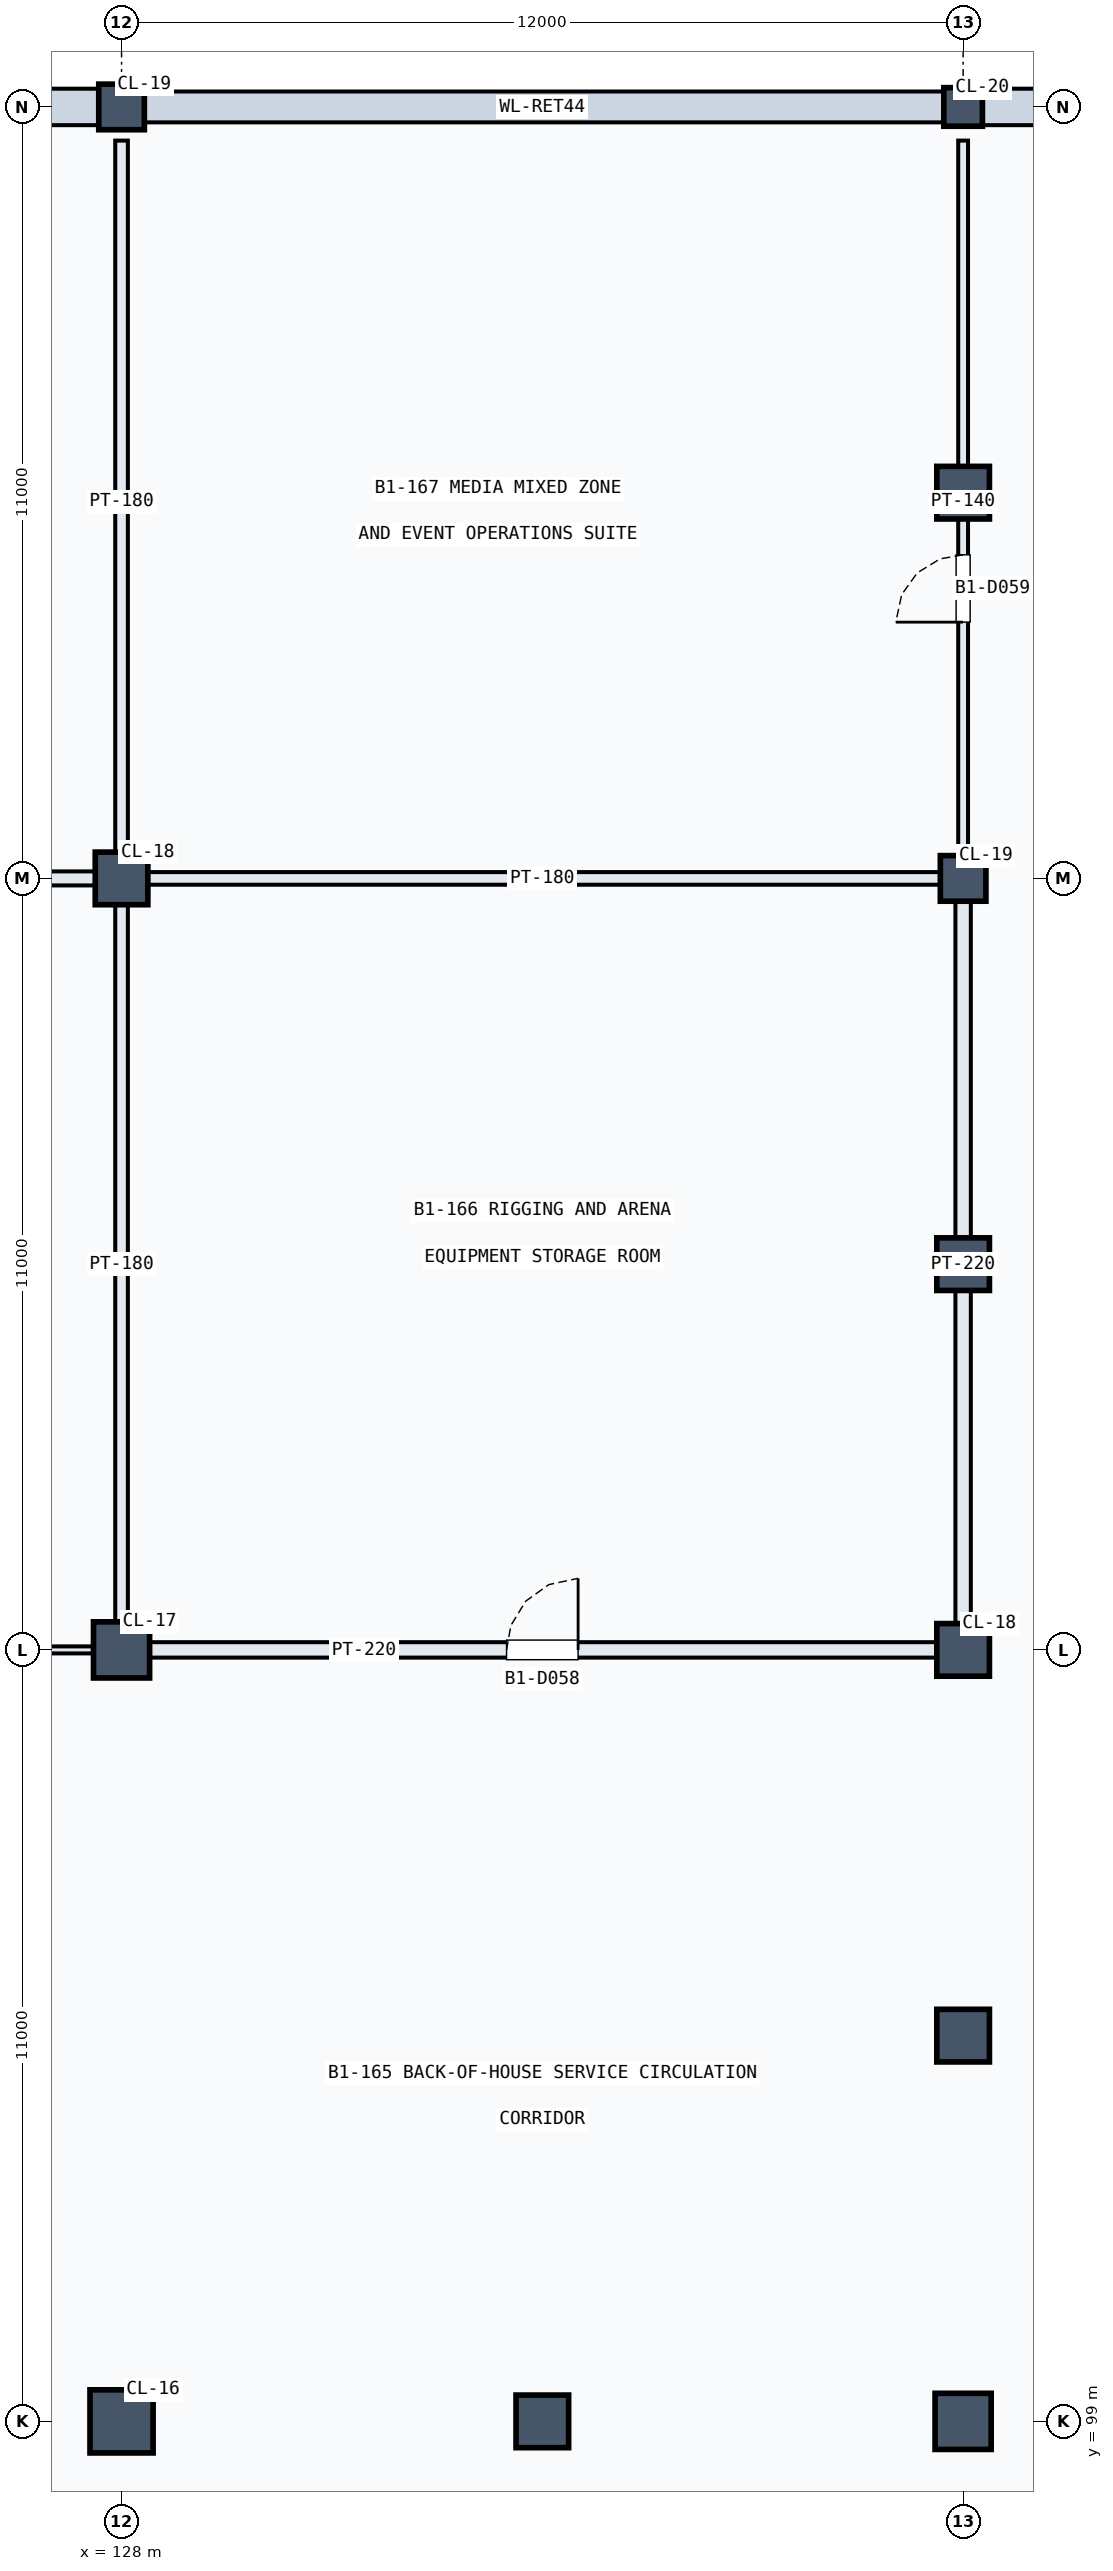
"""IFC4 building model, lengths in metres.
Left out: names, types, materials, properties, quantities, classifications, styles, units other than length and angle.
Written with IfcOpenShell. Run it as: python <this file> out.ifc"""

import sys

from ifc_helpers import new_model, si_unit, direction, frame, frame_2d, origin, origin_2d, place, context, subcontext, project, spatial, rectangle, circle, extrude, element, fill, save


model = new_model("IFC4")
c1 = context("Model", 3, precision=1e-05, world=origin(), true_north=direction((0.0, 1.0)))
c2 = subcontext(c1, "Body", "Model", "MODEL_VIEW")
j1 = project(units=[si_unit("LENGTHUNIT", "METRE"), si_unit("PLANEANGLEUNIT", "RADIAN")], contexts=[c1])
p1 = place(None, origin())
s1 = spatial("IfcSite", under=j1, at=p1, CompositionType="ELEMENT")
p2 = place(p1, origin())
s2 = spatial("IfcBuilding", under=s1, at=p2, CompositionType="ELEMENT")
p3 = place(p2, frame((0.0, 0.0, -5.4)))
s3 = spatial("IfcBuildingStorey", under=s2, at=p3, CompositionType="ELEMENT", Elevation=-5.4)
p4 = place(p3, frame((128.0, 99.0, 0.0), z_axis=(0.0, 0.0, 1.0), x_axis=(1.0, 0.0, 0.0)))
e1 = element("IfcColumn", 1, at=p4, inside=s3, PredefinedType="COLUMN", context=c2, shape_type="SweptSolid", body=[
    extrude(circle(Radius=0.45, at=origin_2d()), origin(), (0.0, 0.0, 1.0), 5.4),
])
p5 = place(p3, frame((128.0, 110.0, 0.0), z_axis=(0.0, 0.0, 1.0), x_axis=(1.0, 0.0, 0.0)))
e2 = element("IfcColumn", 2, at=p5, inside=s3, PredefinedType="COLUMN", context=c2, shape_type="SweptSolid", body=[
    extrude(circle(Radius=0.4, at=origin_2d()), origin(), (0.0, 0.0, 1.0), 5.4),
])
p6 = place(p3, frame((128.0, 121.0, 0.0), z_axis=(0.0, 0.0, 1.0), x_axis=(1.0, 0.0, 0.0)))
e3 = element("IfcColumn", 3, at=p6, inside=s3, PredefinedType="COLUMN", context=c2, shape_type="SweptSolid", body=[
    extrude(circle(Radius=0.375, at=origin_2d()), origin(), (0.0, 0.0, 1.0), 5.4),
])
p7 = place(p3, frame((128.0, 132.0, 0.0), z_axis=(0.0, 0.0, 1.0), x_axis=(1.0, 0.0, 0.0)))
e4 = element("IfcColumn", 4, at=p7, inside=s3, PredefinedType="COLUMN", context=c2, shape_type="SweptSolid", body=[
    extrude(circle(Radius=0.325, at=origin_2d()), origin(), (0.0, 0.0, 1.0), 5.4),
])
p8 = place(p3, frame((140.0, 99.0, 0.0), z_axis=(0.0, 0.0, 1.0), x_axis=(1.0, 0.0, 0.0)))
e5 = element("IfcColumn", 5, at=p8, inside=s3, PredefinedType="COLUMN", context=c2, shape_type="SweptSolid", body=[
    extrude(circle(Radius=0.4, at=origin_2d()), origin(), (0.0, 0.0, 1.0), 5.4),
])
p9 = place(p3, frame((140.0, 110.0, 0.0), z_axis=(0.0, 0.0, 1.0), x_axis=(1.0, 0.0, 0.0)))
e6 = element("IfcColumn", 6, at=p9, inside=s3, PredefinedType="COLUMN", context=c2, shape_type="SweptSolid", body=[
    extrude(circle(Radius=0.375, at=origin_2d()), origin(), (0.0, 0.0, 1.0), 5.4),
])
p10 = place(p3, frame((140.0, 121.0, 0.0), z_axis=(0.0, 0.0, 1.0), x_axis=(1.0, 0.0, 0.0)))
e7 = element("IfcColumn", 7, at=p10, inside=s3, PredefinedType="COLUMN", context=c2, shape_type="SweptSolid", body=[
    extrude(circle(Radius=0.325, at=origin_2d()), origin(), (0.0, 0.0, 1.0), 5.4),
])
p11 = place(p3, frame((140.0, 132.0, 0.0), z_axis=(0.0, 0.0, 1.0), x_axis=(1.0, 0.0, 0.0)))
e8 = element("IfcColumn", 8, at=p11, inside=s3, PredefinedType="COLUMN", context=c2, shape_type="SweptSolid", body=[
    extrude(circle(Radius=0.275, at=origin_2d()), origin(), (0.0, 0.0, 1.0), 5.4),
])
for number, where, z_axis, x_axis in (
    (9, (134.0, 99.0, 0.0), (0.0, 0.0, 1.0), (1.0, 0.0, 0.0)),
    (10, (140.0, 104.5, 0.0), (0.0, 0.0, 1.0), (1.0, 0.0, 0.0)),
    (11, (140.0, 115.5, 0.0), (0.0, 0.0, 1.0), (1.0, 0.0, 0.0)),
    (12, (140.0, 126.5, 0.0), (0.0, 0.0, 1.0), (1.0, 0.0, 0.0)),
):
    element("IfcColumn", number, at=place(p3, frame(where, z_axis=z_axis, x_axis=x_axis)), inside=s3, PredefinedType="COLUMN", context=c2, shape_type="SweptSolid", body=[
        extrude(circle(Radius=0.375, at=origin_2d()), origin(), (0.0, 0.0, 1.0), 5.4),
    ])
p12 = place(p3, frame((116.22, 132.0, 0.0), z_axis=(0.0, 0.0, 1.0), x_axis=(1.0, 0.0, 0.0)))
e13 = element("IfcWall", 13, at=p12, inside=s3, PredefinedType="SOLIDWALL", context=c2, shape_type="SweptSolid", body=[
    extrude(rectangle(XDim=11.56, YDim=0.52, at=frame_2d((5.78, 0.0))), origin(), (0.0, 0.0, 1.0), 4.418),
])
p13 = place(p3, frame((128.22, 132.0, 0.0), z_axis=(0.0, 0.0, 1.0), x_axis=(1.0, 0.0, 0.0)))
e14 = element("IfcWall", 14, at=p13, inside=s3, PredefinedType="SOLIDWALL", context=c2, shape_type="SweptSolid", body=[
    extrude(rectangle(XDim=11.56, YDim=0.44, at=frame_2d((5.78, 0.0))), origin(), (0.0, 0.0, 1.0), 4.418),
])
p14 = place(p3, frame((140.22, 132.0, 0.0), z_axis=(0.0, 0.0, 1.0), x_axis=(1.0, 0.0, 0.0)))
e15 = element("IfcWall", 15, at=p14, inside=s3, PredefinedType="SOLIDWALL", context=c2, shape_type="SweptSolid", body=[
    extrude(rectangle(XDim=11.56, YDim=0.52, at=frame_2d((5.78, 0.0))), origin(), (0.0, 0.0, 1.0), 4.23),
])
p15 = place(p3, frame((116.22, 110.0, 0.0), z_axis=(0.0, 0.0, 1.0), x_axis=(1.0, 0.0, 0.0)))
e16 = element("IfcWall", 16, at=p15, inside=s3, PredefinedType="PARTITIONING", context=c2, shape_type="SweptSolid", body=[
    extrude(rectangle(XDim=11.56, YDim=0.1, at=frame_2d((5.78, 0.0))), origin(), (0.0, 0.0, 1.0), 4.28),
])
p16 = place(p15, frame((4.805, 0.0, 0.0)))
e17 = element("IfcOpeningElement", 17, at=p16, cuts=e16, PredefinedType="OPENING", context=c2, shape_type="SweptSolid", body=[
    extrude(rectangle(XDim=1.95, YDim=2.4, at=frame_2d((0.975, 1.2))), frame((0.0, 0.06, 0.0), z_axis=(0.0, -1.0, 0.0), x_axis=(1.0, 0.0, 0.0)), (0.0, 0.0, 1.0), 0.12),
])
p17 = place(p3, frame((128.22, 110.0, 0.0), z_axis=(0.0, 0.0, 1.0), x_axis=(1.0, 0.0, 0.0)))
e18 = element("IfcWall", 18, at=p17, inside=s3, PredefinedType="PARTITIONING", context=c2, shape_type="SweptSolid", body=[
    extrude(rectangle(XDim=11.56, YDim=0.22, at=frame_2d((5.78, 0.0))), origin(), (0.0, 0.0, 1.0), 4.346),
])
p18 = place(p17, frame((5.27, 0.0, 0.0)))
e19 = element("IfcOpeningElement", 19, at=p18, cuts=e18, PredefinedType="OPENING", context=c2, shape_type="SweptSolid", body=[
    extrude(rectangle(XDim=1.02, YDim=2.25, at=frame_2d((0.51, 1.125))), frame((0.0, 0.12, 0.0), z_axis=(0.0, -1.0, 0.0), x_axis=(1.0, 0.0, 0.0)), (0.0, 0.0, 1.0), 0.24),
])
p19 = place(p3, frame((140.0, 110.22, 0.0), z_axis=(0.0, 0.0, 1.0), x_axis=(0.0, 1.0, 0.0)))
e20 = element("IfcWall", 20, at=p19, inside=s3, PredefinedType="PARTITIONING", context=c2, shape_type="SweptSolid", body=[
    extrude(rectangle(XDim=10.56, YDim=0.22, at=frame_2d((5.28, 0.0))), origin(), (0.0, 0.0, 1.0), 4.41),
])
p20 = place(p3, frame((140.0, 121.22, 0.0), z_axis=(0.0, 0.0, 1.0), x_axis=(0.0, 1.0, 0.0)))
e21 = element("IfcWall", 21, at=p20, inside=s3, PredefinedType="PARTITIONING", context=c2, shape_type="SweptSolid", body=[
    extrude(rectangle(XDim=10.3, YDim=0.14, at=frame_2d((5.15, 0.0))), origin(), (0.0, 0.0, 1.0), 4.43),
])
p21 = place(p20, frame((3.434, 0.0, 0.0)))
e22 = element("IfcOpeningElement", 22, at=p21, cuts=e21, PredefinedType="OPENING", context=c2, shape_type="SweptSolid", body=[
    extrude(rectangle(XDim=0.96, YDim=2.15, at=frame_2d((0.48, 1.075))), frame((0.0, 0.08, 0.0), z_axis=(0.0, -1.0, 0.0), x_axis=(1.0, 0.0, 0.0)), (0.0, 0.0, 1.0), 0.16),
])
p22 = place(p3, frame((116.22, 121.0, 0.0), z_axis=(0.0, 0.0, 1.0), x_axis=(1.0, 0.0, 0.0)))
e23 = element("IfcWall", 23, at=p22, inside=s3, PredefinedType="PARTITIONING", context=c2, shape_type="SweptSolid", body=[
    extrude(rectangle(XDim=11.56, YDim=0.2, at=frame_2d((5.78, 0.0))), origin(), (0.0, 0.0, 1.0), 4.33),
])
p23 = place(p3, frame((128.0, 110.22, 0.0), z_axis=(0.0, 0.0, 1.0), x_axis=(0.0, 1.0, 0.0)))
e24 = element("IfcWall", 24, at=p23, inside=s3, PredefinedType="PARTITIONING", context=c2, shape_type="SweptSolid", body=[
    extrude(rectangle(XDim=10.56, YDim=0.18, at=frame_2d((5.28, 0.0))), origin(), (0.0, 0.0, 1.0), 4.346),
])
p24 = place(p3, frame((128.0, 121.22, 0.0), z_axis=(0.0, 0.0, 1.0), x_axis=(0.0, 1.0, 0.0)))
e25 = element("IfcWall", 25, at=p24, inside=s3, PredefinedType="PARTITIONING", context=c2, shape_type="SweptSolid", body=[
    extrude(rectangle(XDim=10.3, YDim=0.18, at=frame_2d((5.15, 0.0))), origin(), (0.0, 0.0, 1.0), 4.41),
])
p25 = place(p3, frame((128.22, 121.0, 0.0), z_axis=(0.0, 0.0, 1.0), x_axis=(1.0, 0.0, 0.0)))
e26 = element("IfcWall", 26, at=p25, inside=s3, PredefinedType="PARTITIONING", context=c2, shape_type="SweptSolid", body=[
    extrude(rectangle(XDim=11.56, YDim=0.18, at=frame_2d((5.78, 0.0))), origin(), (0.0, 0.0, 1.0), 4.41),
])
p26 = place(p18, origin())
e27 = element("IfcDoor", 27, at=p26, inside=s3, OperationType="SINGLE_SWING_RIGHT", PredefinedType="DOOR", context=c2, shape_type="SweptSolid", body=[
    extrude(rectangle(XDim=1.02, YDim=2.25, at=frame_2d((0.51, 1.125))), frame((0.0, 0.025, 0.0), z_axis=(0.0, -1.0, 0.0), x_axis=(1.0, 0.0, 0.0)), (0.0, 0.0, 1.0), 0.05),
])
fill(e19, e27)
p27 = place(p21, origin())
e28 = element("IfcDoor", 28, at=p27, inside=s3, OperationType="SINGLE_SWING_LEFT", PredefinedType="DOOR", context=c2, shape_type="SweptSolid", body=[
    extrude(rectangle(XDim=0.96, YDim=2.15, at=frame_2d((0.48, 1.075))), frame((0.0, 0.025, 0.0), z_axis=(0.0, -1.0, 0.0), x_axis=(1.0, 0.0, 0.0)), (0.0, 0.0, 1.0), 0.05),
])
fill(e22, e28)
save(model, sys.argv[1])
